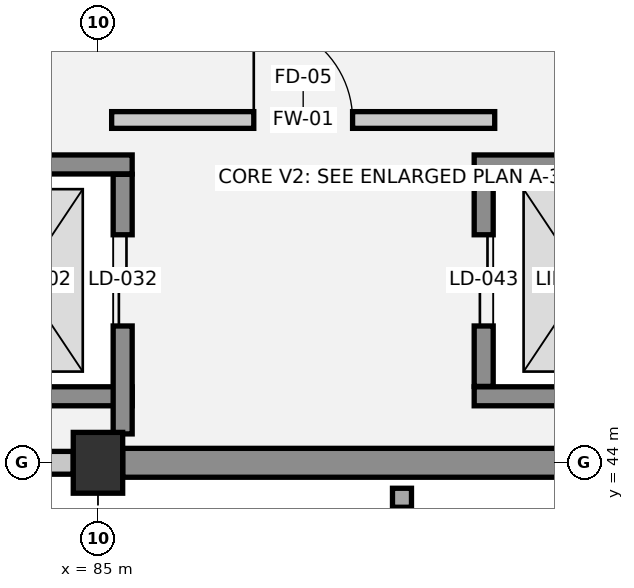
"""IFC4 building model, lengths in metres.
Left out: names, types, materials, properties, quantities, classifications, styles, units other than length and angle.
Written with IfcOpenShell. Run it as: python <this file> out.ifc"""

import sys

from ifc_helpers import new_model, si_unit, direction, frame, frame_2d, origin, origin_2d, place, context, subcontext, project, spatial, rectangle, extrude, element, fill, save


model = new_model("IFC4")
c1 = context("Model", 3, precision=1e-05, world=origin(), true_north=direction((0.0, 1.0)))
c2 = subcontext(c1, "Body", "Model", "MODEL_VIEW")
j1 = project(units=[si_unit("LENGTHUNIT", "METRE"), si_unit("PLANEANGLEUNIT", "RADIAN")], contexts=[c1])
p1 = place(None, origin())
s1 = spatial("IfcSite", under=j1, at=p1, CompositionType="ELEMENT")
p2 = place(p1, origin())
s2 = spatial("IfcBuilding", under=s1, at=p2, CompositionType="ELEMENT")
p3 = place(p2, frame((0.0, 0.0, 14.4)))
s3 = spatial("IfcBuildingStorey", under=s2, at=p3, CompositionType="ELEMENT", Elevation=14.4)
p4 = place(p3, frame((85.0, 44.0, 0.0), z_axis=(0.0, 0.0, 1.0), x_axis=(1.0, 0.0, 0.0)))
e1 = element("IfcColumn", 1, at=p4, inside=s3, PredefinedType="COLUMN", context=c2, shape_type="SweptSolid", body=[
    extrude(rectangle(XDim=0.65, YDim=0.8, at=origin_2d()), origin(), (0.0, 0.0, 1.0), 3.9),
])
p5 = place(p3, frame((92.675, 44.0, 0.0), z_axis=(0.0, 0.0, 1.0), x_axis=(-1.0, 0.0, 0.0)))
e2 = element("IfcWall", 2, at=p5, inside=s3, PredefinedType="STANDARD", context=c2, shape_type="SweptSolid", body=[
    extrude(rectangle(XDim=7.35, YDim=0.38, at=frame_2d((3.675, 0.0))), origin(), (0.0, 0.0, 1.0), 2.61),
])
p6 = place(p3, frame((84.675, 44.0, 0.0), z_axis=(0.0, 0.0, 1.0), x_axis=(-1.0, 0.0, 0.0)))
e3 = element("IfcWall", 3, at=p6, inside=s3, PredefinedType="SOLIDWALL", context=c2, shape_type="SweptSolid", body=[
    extrude(rectangle(XDim=7.35, YDim=0.3, at=frame_2d((3.675, 0.0))), origin(), (0.0, 0.0, 1.0), 2.61),
])
p7 = place(p6, frame((2.575, 0.0, 0.9)))
e4 = element("IfcOpeningElement", 4, at=p7, cuts=e3, PredefinedType="OPENING", context=c2, shape_type="SweptSolid", body=[
    extrude(rectangle(XDim=2.2, YDim=1.0, at=frame_2d((1.1, 0.5))), frame((0.0, 0.16, 0.0), z_axis=(0.0, -1.0, 0.0), x_axis=(1.0, 0.0, 0.0)), (0.0, 0.0, 1.0), 0.32),
])
for number, where, z_axis, x_axis in (
    (5, (82.55, 44.875, 0.0), (0.0, 0.0, 1.0), (1.0, 0.0, 0.0)),
    (6, (85.45, 47.925, 0.0), (0.0, 0.0, 1.0), (-1.0, 0.0, 0.0)),
):
    element("IfcWall", number, at=place(p3, frame(where, z_axis=z_axis, x_axis=x_axis)), inside=s3, PredefinedType="SHEAR", context=c2, shape_type="SweptSolid", body=[
        extrude(rectangle(XDim=2.9, YDim=0.25, at=frame_2d((1.45, 0.0))), origin(), (0.0, 0.0, 1.0), 3.9),
    ])
p8 = place(p3, frame((85.325, 44.38, 0.0), z_axis=(0.0, 0.0, 1.0), x_axis=(0.0, 1.0, 0.0)))
e7 = element("IfcWall", 7, at=p8, inside=s3, PredefinedType="SHEAR", context=c2, shape_type="SweptSolid", body=[
    extrude(rectangle(XDim=3.415, YDim=0.25, at=frame_2d((1.708, 0.0))), origin(), (0.0, 0.0, 1.0), 3.9),
])
p9 = place(p8, frame((1.42, 0.0, 0.0)))
e8 = element("IfcOpeningElement", 8, at=p9, cuts=e7, PredefinedType="OPENING", context=c2, shape_type="SweptSolid", body=[
    extrude(rectangle(XDim=1.2, YDim=2.2, at=frame_2d((0.6, 1.1))), frame((0.0, 0.135, 0.0), z_axis=(0.0, -1.0, 0.0), x_axis=(1.0, 0.0, 0.0)), (0.0, 0.0, 1.0), 0.27),
])
for number, where, z_axis, x_axis in (
    (9, (89.95, 44.875, 0.0), (0.0, 0.0, 1.0), (1.0, 0.0, 0.0)),
    (10, (92.85, 47.925, 0.0), (0.0, 0.0, 1.0), (-1.0, 0.0, 0.0)),
):
    element("IfcWall", number, at=place(p3, frame(where, z_axis=z_axis, x_axis=x_axis)), inside=s3, PredefinedType="SHEAR", context=c2, shape_type="SweptSolid", body=[
        extrude(rectangle(XDim=2.9, YDim=0.25, at=frame_2d((1.45, 0.0))), origin(), (0.0, 0.0, 1.0), 3.9),
    ])
p10 = place(p3, frame((90.075, 47.795, 0.0), z_axis=(0.0, 0.0, 1.0), x_axis=(0.0, -1.0, 0.0)))
e11 = element("IfcWall", 11, at=p10, inside=s3, PredefinedType="SHEAR", context=c2, shape_type="SweptSolid", body=[
    extrude(rectangle(XDim=2.79, YDim=0.25, at=frame_2d((1.395, 0.0))), origin(), (0.0, 0.0, 1.0), 3.9),
])
p11 = place(p10, frame((0.795, 0.0, 0.0)))
e12 = element("IfcOpeningElement", 12, at=p11, cuts=e11, PredefinedType="OPENING", context=c2, shape_type="SweptSolid", body=[
    extrude(rectangle(XDim=1.2, YDim=2.2, at=frame_2d((0.6, 1.1))), frame((0.0, 0.135, 0.0), z_axis=(0.0, -1.0, 0.0), x_axis=(1.0, 0.0, 0.0)), (0.0, 0.0, 1.0), 0.27),
])
p12 = place(p3, frame((85.18, 48.51, 0.0), z_axis=(0.0, 0.0, 1.0), x_axis=(1.0, 0.0, 0.0)))
e13 = element("IfcWall", 13, at=p12, inside=s3, PredefinedType="SOLIDWALL", context=c2, shape_type="SweptSolid", body=[
    extrude(rectangle(XDim=5.04, YDim=0.22, at=frame_2d((2.52, 0.0))), origin(), (0.0, 0.0, 1.0), 3.62),
])
p13 = place(p12, frame((1.87, 0.0, 0.0)))
e14 = element("IfcOpeningElement", 14, at=p13, cuts=e13, PredefinedType="OPENING", context=c2, shape_type="SweptSolid", body=[
    extrude(rectangle(XDim=1.3, YDim=2.15, at=frame_2d((0.65, 1.075))), frame((0.0, 0.12, 0.0), z_axis=(0.0, -1.0, 0.0), x_axis=(1.0, 0.0, 0.0)), (0.0, 0.0, 1.0), 0.24),
])
p14 = place(p9, origin())
e15 = element("IfcDoor", 15, at=p14, inside=s3, OperationType="DOUBLE_DOOR_SLIDING", PredefinedType="DOOR", context=c2, shape_type="SweptSolid", body=[
    extrude(rectangle(XDim=1.2, YDim=2.2, at=frame_2d((0.6, 1.1))), frame((0.0, 0.025, 0.0), z_axis=(0.0, -1.0, 0.0), x_axis=(1.0, 0.0, 0.0)), (0.0, 0.0, 1.0), 0.05),
])
fill(e8, e15)
p15 = place(p11, origin())
e16 = element("IfcDoor", 16, at=p15, inside=s3, OperationType="DOUBLE_DOOR_SLIDING", PredefinedType="DOOR", context=c2, shape_type="SweptSolid", body=[
    extrude(rectangle(XDim=1.2, YDim=2.2, at=frame_2d((0.6, 1.1))), frame((0.0, 0.025, 0.0), z_axis=(0.0, -1.0, 0.0), x_axis=(1.0, 0.0, 0.0)), (0.0, 0.0, 1.0), 0.05),
])
fill(e12, e16)
p16 = place(p13, origin())
e17 = element("IfcDoor", 17, at=p16, inside=s3, OperationType="SINGLE_SWING_LEFT", PredefinedType="DOOR", context=c2, shape_type="SweptSolid", body=[
    extrude(rectangle(XDim=1.3, YDim=2.15, at=frame_2d((0.65, 1.075))), frame((0.0, 0.025, 0.0), z_axis=(0.0, -1.0, 0.0), x_axis=(1.0, 0.0, 0.0)), (0.0, 0.0, 1.0), 0.05),
])
fill(e14, e17)
save(model, sys.argv[1])
